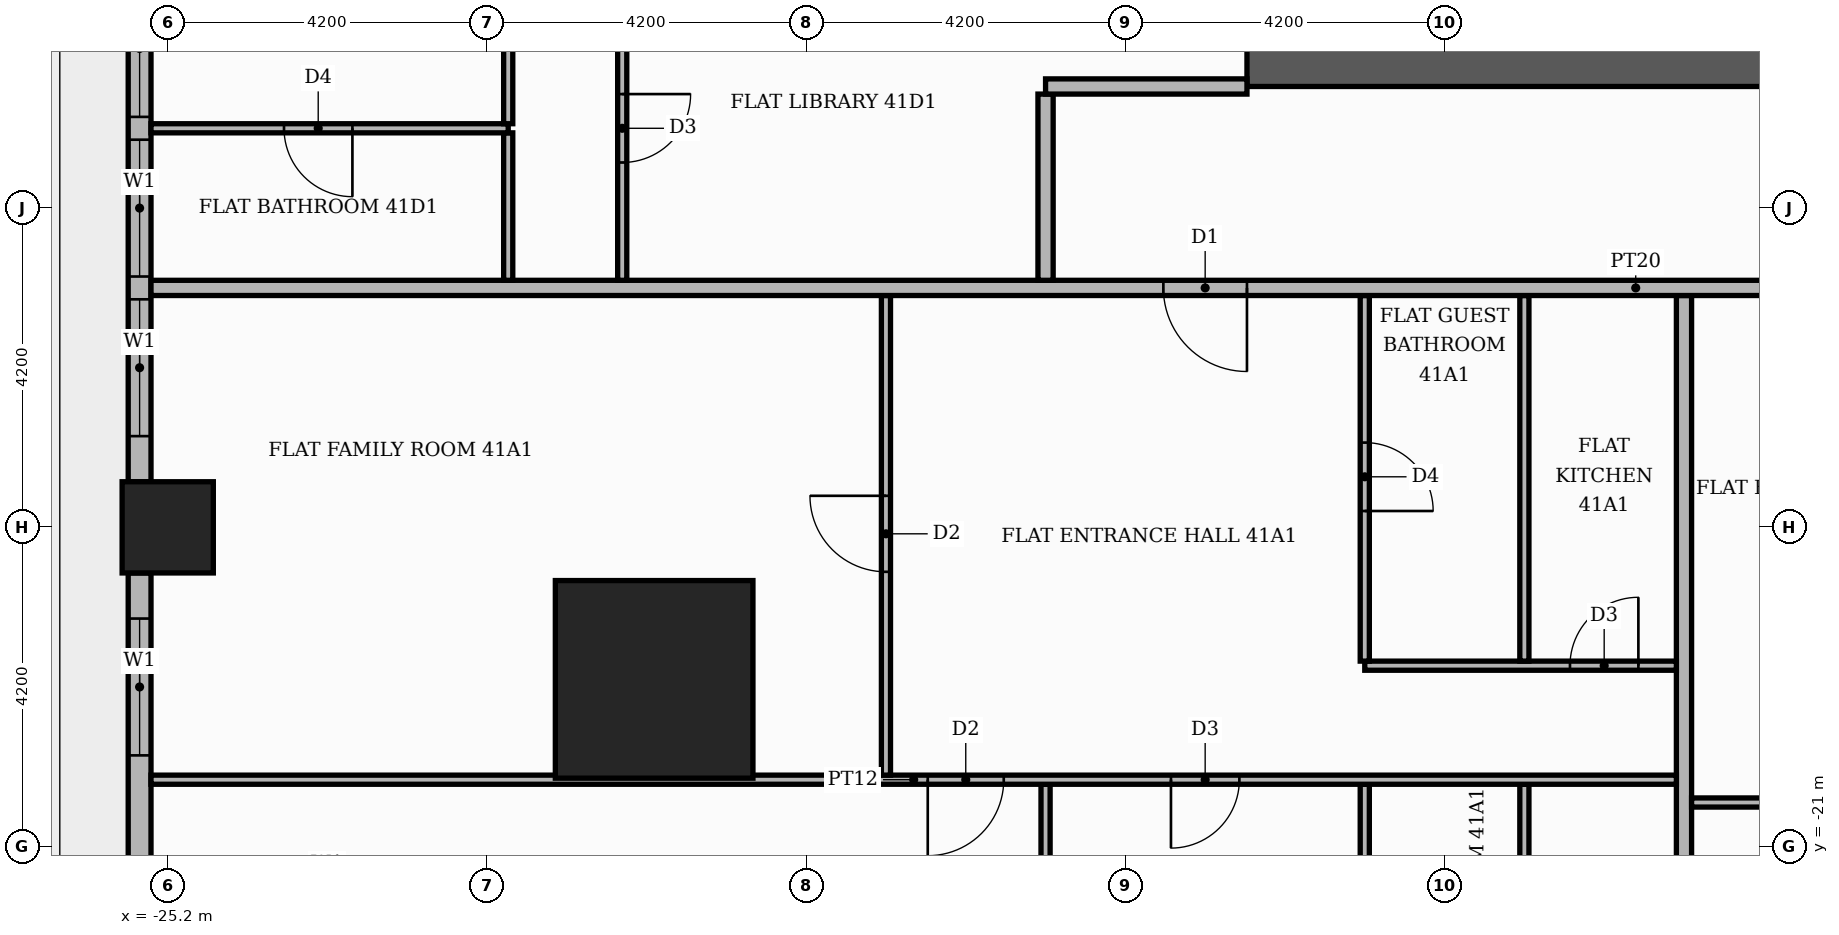
"""IFC4 building model, lengths in metres.
Left out: names, types, materials, properties, quantities, classifications, styles, units other than length and angle.
Written with IfcOpenShell. Run it as: python <this file> out.ifc"""

import sys

from ifc_helpers import new_model, si_unit, direction, frame, frame_2d, origin, origin_2d, place, context, subcontext, project, spatial, rectangle, extrude, element, fill, save


model = new_model("IFC4")
c1 = context("Model", 3, precision=1e-05, world=origin(), true_north=direction((0.0, 1.0)))
c2 = subcontext(c1, "Body", "Model", "MODEL_VIEW")
j1 = project(units=[si_unit("LENGTHUNIT", "METRE"), si_unit("PLANEANGLEUNIT", "RADIAN")], contexts=[c1])
p1 = place(None, origin())
s1 = spatial("IfcSite", under=j1, at=p1, CompositionType="ELEMENT")
p2 = place(p1, origin())
s2 = spatial("IfcBuilding", under=s1, at=p2, CompositionType="ELEMENT")
p3 = place(p2, frame((0.0, 0.0, 172.8)))
s3 = spatial("IfcBuildingStorey", under=s2, at=p3, CompositionType="ELEMENT", Elevation=172.8)
p4 = place(p3, frame((-11.0, -10.55, 0.0), z_axis=(0.0, 0.0, 1.0), x_axis=(1.0, 0.0, 0.0)))
e1 = element("IfcWall", 1, at=p4, inside=s3, PredefinedType="SHEAR", context=c2, shape_type="SweptSolid", body=[
    extrude(rectangle(XDim=22.0, YDim=0.9, at=frame_2d((11.0, 0.0))), origin(), (0.0, 0.0, 1.0), 3.48),
])
p5 = place(p4, frame((7.4, 0.0, 0.0)))
e2 = element("IfcOpeningElement", 2, at=p5, cuts=e1, PredefinedType="OPENING", context=c2, shape_type="SweptSolid", body=[
    extrude(rectangle(XDim=1.8, YDim=2.2, at=frame_2d((0.9, 1.1))), frame((0.0, 0.46, 0.0), z_axis=(0.0, -1.0, 0.0), x_axis=(1.0, 0.0, 0.0)), (0.0, 0.0, 1.0), 0.92),
])
p6 = place(p3, frame((-18.8, -18.8, 0.0), z_axis=(0.0, 0.0, 1.0), x_axis=(1.0, 0.0, 0.0)))
e3 = element("IfcColumn", 3, at=p6, inside=s3, PredefinedType="COLUMN", context=c2, shape_type="SweptSolid", body=[
    extrude(rectangle(XDim=2.6, YDim=2.6, at=origin_2d()), origin(), (0.0, 0.0, 1.0), 3.9),
])
p7 = place(p3, frame((-25.2, -16.8, 0.0), z_axis=(0.0, 0.0, 1.0), x_axis=(1.0, 0.0, 0.0)))
e4 = element("IfcColumn", 4, at=p7, inside=s3, PredefinedType="COLUMN", context=c2, shape_type="SweptSolid", body=[
    extrude(rectangle(XDim=1.2, YDim=1.2, at=origin_2d()), origin(), (0.0, 0.0, 1.0), 3.9),
])
p8 = place(p3, frame((-25.57, -9.0, 0.0), z_axis=(0.0, 0.0, 1.0), x_axis=(0.0, -1.0, 0.0)))
e5 = element("IfcWall", 5, at=p8, inside=s3, PredefinedType="STANDARD", context=c2, shape_type="SweptSolid", body=[
    extrude(rectangle(XDim=7.2, YDim=0.3, at=frame_2d((3.6, 0.0))), origin(), (0.0, 0.0, 1.0), 3.48),
])
p9 = place(p8, frame((0.6, 0.0, 0.9)))
e6 = element("IfcOpeningElement", 6, at=p9, cuts=e5, PredefinedType="OPENING", context=c2, shape_type="SweptSolid", body=[
    extrude(rectangle(XDim=1.8, YDim=2.1, at=frame_2d((0.9, 1.05))), frame((0.0, 0.16, 0.0), z_axis=(0.0, -1.0, 0.0), x_axis=(1.0, 0.0, 0.0)), (0.0, 0.0, 1.0), 0.32),
])
p10 = place(p8, frame((2.7, 0.0, 0.9)))
e7 = element("IfcOpeningElement", 7, at=p10, cuts=e5, PredefinedType="OPENING", context=c2, shape_type="SweptSolid", body=[
    extrude(rectangle(XDim=1.8, YDim=2.1, at=frame_2d((0.9, 1.05))), frame((0.0, 0.16, 0.0), z_axis=(0.0, -1.0, 0.0), x_axis=(1.0, 0.0, 0.0)), (0.0, 0.0, 1.0), 0.32),
])
p11 = place(p8, frame((4.8, 0.0, 0.9)))
e8 = element("IfcOpeningElement", 8, at=p11, cuts=e5, PredefinedType="OPENING", context=c2, shape_type="SweptSolid", body=[
    extrude(rectangle(XDim=1.8, YDim=2.1, at=frame_2d((0.9, 1.05))), frame((0.0, 0.16, 0.0), z_axis=(0.0, -1.0, 0.0), x_axis=(1.0, 0.0, 0.0)), (0.0, 0.0, 1.0), 0.32),
])
p12 = place(p3, frame((-25.57, -17.4, 0.0), z_axis=(0.0, 0.0, 1.0), x_axis=(0.0, -1.0, 0.0)))
e9 = element("IfcWall", 9, at=p12, inside=s3, PredefinedType="STANDARD", context=c2, shape_type="SweptSolid", body=[
    extrude(rectangle(XDim=4.32, YDim=0.3, at=frame_2d((2.16, 0.0))), origin(), (0.0, 0.0, 1.0), 3.48),
])
p13 = place(p12, frame((0.6, 0.0, 0.9)))
e10 = element("IfcOpeningElement", 10, at=p13, cuts=e9, PredefinedType="OPENING", context=c2, shape_type="SweptSolid", body=[
    extrude(rectangle(XDim=1.8, YDim=2.1, at=frame_2d((0.9, 1.05))), frame((0.0, 0.16, 0.0), z_axis=(0.0, -1.0, 0.0), x_axis=(1.0, 0.0, 0.0)), (0.0, 0.0, 1.0), 0.32),
])
p14 = place(p3, frame((-13.65, -25.42, 0.0), z_axis=(0.0, 0.0, 1.0), x_axis=(0.0, 1.0, 0.0)))
e11 = element("IfcWall", 11, at=p14, inside=s3, PredefinedType="PARTITIONING", context=c2, shape_type="SweptSolid", body=[
    extrude(rectangle(XDim=5.24, YDim=0.12, at=frame_2d((2.62, 0.0))), origin(), (0.0, 0.0, 1.0), 3.48),
])
p15 = place(p3, frame((-9.45, -25.42, 0.0), z_axis=(0.0, 0.0, 1.0), x_axis=(0.0, 1.0, 0.0)))
e12 = element("IfcWall", 12, at=p15, inside=s3, PredefinedType="PARTITIONING", context=c2, shape_type="SweptSolid", body=[
    extrude(rectangle(XDim=5.24, YDim=0.12, at=frame_2d((2.62, 0.0))), origin(), (0.0, 0.0, 1.0), 3.48),
])
p16 = place(p15, frame((2.05, 0.0, 0.0)))
e13 = element("IfcOpeningElement", 13, at=p16, cuts=e12, PredefinedType="OPENING", context=c2, shape_type="SweptSolid", body=[
    extrude(rectangle(XDim=0.9, YDim=2.1, at=frame_2d((0.45, 1.05))), frame((0.0, 0.07, 0.0), z_axis=(0.0, -1.0, 0.0), x_axis=(1.0, 0.0, 0.0)), (0.0, 0.0, 1.0), 0.14),
])
p17 = place(p3, frame((-7.35, -25.42, 0.0), z_axis=(0.0, 0.0, 1.0), x_axis=(0.0, 1.0, 0.0)))
e14 = element("IfcWall", 14, at=p17, inside=s3, PredefinedType="PARTITIONING", context=c2, shape_type="SweptSolid", body=[
    extrude(rectangle(XDim=5.24, YDim=0.12, at=frame_2d((2.62, 0.0))), origin(), (0.0, 0.0, 1.0), 3.48),
])
p18 = place(p17, frame((2.05, 0.0, 0.0)))
e15 = element("IfcOpeningElement", 15, at=p18, cuts=e14, PredefinedType="OPENING", context=c2, shape_type="SweptSolid", body=[
    extrude(rectangle(XDim=0.9, YDim=2.1, at=frame_2d((0.45, 1.05))), frame((0.0, 0.07, 0.0), z_axis=(0.0, -1.0, 0.0), x_axis=(1.0, 0.0, 0.0)), (0.0, 0.0, 1.0), 0.14),
])
p19 = place(p3, frame((-5.25, -25.42, 0.0), z_axis=(0.0, 0.0, 1.0), x_axis=(0.0, 1.0, 0.0)))
e16 = element("IfcWall", 16, at=p19, inside=s3, PredefinedType="PARTITIONING", context=c2, shape_type="SweptSolid", body=[
    extrude(rectangle(XDim=11.67, YDim=0.2, at=frame_2d((5.835, 0.0))), origin(), (0.0, 0.0, 1.0), 3.48),
])
p20 = place(p3, frame((-5.15, -20.42, 0.0), z_axis=(0.0, 0.0, 1.0), x_axis=(1.0, 0.0, 0.0)))
e17 = element("IfcWall", 17, at=p20, inside=s3, PredefinedType="PARTITIONING", context=c2, shape_type="SweptSolid", body=[
    extrude(rectangle(XDim=18.7, YDim=0.12, at=frame_2d((9.35, 0.0))), origin(), (0.0, 0.0, 1.0), 3.48),
])
p21 = place(p20, frame((1.5, 0.0, 0.0)))
e18 = element("IfcOpeningElement", 18, at=p21, cuts=e17, PredefinedType="OPENING", context=c2, shape_type="SweptSolid", body=[
    extrude(rectangle(XDim=1.0, YDim=2.1, at=frame_2d((0.5, 1.05))), frame((0.0, 0.07, 0.0), z_axis=(0.0, -1.0, 0.0), x_axis=(1.0, 0.0, 0.0)), (0.0, 0.0, 1.0), 0.14),
])
p22 = place(p20, frame((5.75, 0.0, 0.0)))
e19 = element("IfcOpeningElement", 19, at=p22, cuts=e17, PredefinedType="OPENING", context=c2, shape_type="SweptSolid", body=[
    extrude(rectangle(XDim=0.9, YDim=2.1, at=frame_2d((0.45, 1.05))), frame((0.0, 0.07, 0.0), z_axis=(0.0, -1.0, 0.0), x_axis=(1.0, 0.0, 0.0)), (0.0, 0.0, 1.0), 0.14),
])
p23 = place(p20, frame((14.15, 0.0, 0.0)))
e20 = element("IfcOpeningElement", 20, at=p23, cuts=e17, PredefinedType="OPENING", context=c2, shape_type="SweptSolid", body=[
    extrude(rectangle(XDim=0.9, YDim=2.1, at=frame_2d((0.45, 1.05))), frame((0.0, 0.07, 0.0), z_axis=(0.0, -1.0, 0.0), x_axis=(1.0, 0.0, 0.0)), (0.0, 0.0, 1.0), 0.14),
])
p24 = place(p3, frame((-25.42, -20.12, 0.0), z_axis=(0.0, 0.0, 1.0), x_axis=(1.0, 0.0, 0.0)))
e21 = element("IfcWall", 21, at=p24, inside=s3, PredefinedType="PARTITIONING", context=c2, shape_type="SweptSolid", body=[
    extrude(rectangle(XDim=20.07, YDim=0.12, at=frame_2d((10.035, 0.0))), origin(), (0.0, 0.0, 1.0), 3.48),
])
p25 = place(p24, frame((10.22, 0.0, 0.0)))
e22 = element("IfcOpeningElement", 22, at=p25, cuts=e21, PredefinedType="OPENING", context=c2, shape_type="SweptSolid", body=[
    extrude(rectangle(XDim=1.0, YDim=2.1, at=frame_2d((0.5, 1.05))), frame((0.0, 0.07, 0.0), z_axis=(0.0, -1.0, 0.0), x_axis=(1.0, 0.0, 0.0)), (0.0, 0.0, 1.0), 0.14),
])
p26 = place(p24, frame((13.42, 0.0, 0.0)))
e23 = element("IfcOpeningElement", 23, at=p26, cuts=e21, PredefinedType="OPENING", context=c2, shape_type="SweptSolid", body=[
    extrude(rectangle(XDim=0.9, YDim=2.1, at=frame_2d((0.45, 1.05))), frame((0.0, 0.07, 0.0), z_axis=(0.0, -1.0, 0.0), x_axis=(1.0, 0.0, 0.0)), (0.0, 0.0, 1.0), 0.14),
])
p27 = place(p3, frame((-15.75, -20.06, 0.0), z_axis=(0.0, 0.0, 1.0), x_axis=(0.0, 1.0, 0.0)))
e24 = element("IfcWall", 24, at=p27, inside=s3, PredefinedType="PARTITIONING", context=c2, shape_type="SweptSolid", body=[
    extrude(rectangle(XDim=6.31, YDim=0.12, at=frame_2d((3.155, 0.0))), origin(), (0.0, 0.0, 1.0), 3.48),
])
p28 = place(p27, frame((2.675, 0.0, 0.0)))
e25 = element("IfcOpeningElement", 25, at=p28, cuts=e24, PredefinedType="OPENING", context=c2, shape_type="SweptSolid", body=[
    extrude(rectangle(XDim=1.0, YDim=2.1, at=frame_2d((0.5, 1.05))), frame((0.0, 0.07, 0.0), z_axis=(0.0, -1.0, 0.0), x_axis=(1.0, 0.0, 0.0)), (0.0, 0.0, 1.0), 0.14),
])
p29 = place(p3, frame((-9.45, -18.62, 0.0), z_axis=(0.0, 0.0, 1.0), x_axis=(1.0, 0.0, 0.0)))
e26 = element("IfcWall", 26, at=p29, inside=s3, PredefinedType="PARTITIONING", context=c2, shape_type="SweptSolid", body=[
    extrude(rectangle(XDim=4.1, YDim=0.12, at=frame_2d((2.05, 0.0))), origin(), (0.0, 0.0, 1.0), 3.48),
])
p30 = place(p29, frame((2.7, 0.0, 0.0)))
e27 = element("IfcOpeningElement", 27, at=p30, cuts=e26, PredefinedType="OPENING", context=c2, shape_type="SweptSolid", body=[
    extrude(rectangle(XDim=0.9, YDim=2.1, at=frame_2d((0.45, 1.05))), frame((0.0, 0.07, 0.0), z_axis=(0.0, -1.0, 0.0), x_axis=(1.0, 0.0, 0.0)), (0.0, 0.0, 1.0), 0.14),
])
p31 = place(p3, frame((-9.45, -18.56, 0.0), z_axis=(0.0, 0.0, 1.0), x_axis=(0.0, 1.0, 0.0)))
e28 = element("IfcWall", 28, at=p31, inside=s3, PredefinedType="PARTITIONING", context=c2, shape_type="SweptSolid", body=[
    extrude(rectangle(XDim=4.81, YDim=0.12, at=frame_2d((2.405, 0.0))), origin(), (0.0, 0.0, 1.0), 3.48),
])
p32 = place(p31, frame((1.975, 0.0, 0.0)))
e29 = element("IfcOpeningElement", 29, at=p32, cuts=e28, PredefinedType="OPENING", context=c2, shape_type="SweptSolid", body=[
    extrude(rectangle(XDim=0.9, YDim=2.1, at=frame_2d((0.45, 1.05))), frame((0.0, 0.07, 0.0), z_axis=(0.0, -1.0, 0.0), x_axis=(1.0, 0.0, 0.0)), (0.0, 0.0, 1.0), 0.14),
])
p33 = place(p3, frame((-7.35, -18.56, 0.0), z_axis=(0.0, 0.0, 1.0), x_axis=(0.0, 1.0, 0.0)))
e30 = element("IfcWall", 30, at=p33, inside=s3, PredefinedType="PARTITIONING", context=c2, shape_type="SweptSolid", body=[
    extrude(rectangle(XDim=4.81, YDim=0.12, at=frame_2d((2.405, 0.0))), origin(), (0.0, 0.0, 1.0), 3.48),
])
p34 = place(p3, frame((-25.42, -13.65, 0.0), z_axis=(0.0, 0.0, 1.0), x_axis=(1.0, 0.0, 0.0)))
e31 = element("IfcWall", 31, at=p34, inside=s3, PredefinedType="PARTITIONING", context=c2, shape_type="SweptSolid", body=[
    extrude(rectangle(XDim=39.07, YDim=0.2, at=frame_2d((19.535, 0.0))), origin(), (0.0, 0.0, 1.0), 3.48),
])
p35 = place(p34, frame((13.32, 0.0, 0.0)))
e32 = element("IfcOpeningElement", 32, at=p35, cuts=e31, PredefinedType="OPENING", context=c2, shape_type="SweptSolid", body=[
    extrude(rectangle(XDim=1.1, YDim=2.4, at=frame_2d((0.55, 1.2))), frame((0.0, 0.11, 0.0), z_axis=(0.0, -1.0, 0.0), x_axis=(1.0, 0.0, 0.0)), (0.0, 0.0, 1.0), 0.22),
])
p36 = place(p34, frame((21.72, 0.0, 0.0)))
e33 = element("IfcOpeningElement", 33, at=p36, cuts=e31, PredefinedType="OPENING", context=c2, shape_type="SweptSolid", body=[
    extrude(rectangle(XDim=1.1, YDim=2.4, at=frame_2d((0.55, 1.2))), frame((0.0, 0.11, 0.0), z_axis=(0.0, -1.0, 0.0), x_axis=(1.0, 0.0, 0.0)), (0.0, 0.0, 1.0), 0.22),
])
p37 = place(p3, frame((-20.72, -13.55, 0.0), z_axis=(0.0, 0.0, 1.0), x_axis=(0.0, 1.0, 0.0)))
e34 = element("IfcWall", 34, at=p37, inside=s3, PredefinedType="PARTITIONING", context=c2, shape_type="SweptSolid", body=[
    extrude(rectangle(XDim=1.94, YDim=0.12, at=frame_2d((0.97, 0.0))), origin(), (0.0, 0.0, 1.0), 3.48),
])
p38 = place(p3, frame((-19.22, -13.55, 0.0), z_axis=(0.0, 0.0, 1.0), x_axis=(0.0, 1.0, 0.0)))
e35 = element("IfcWall", 35, at=p38, inside=s3, PredefinedType="PARTITIONING", context=c2, shape_type="SweptSolid", body=[
    extrude(rectangle(XDim=4.04, YDim=0.12, at=frame_2d((2.02, 0.0))), origin(), (0.0, 0.0, 1.0), 3.48),
])
p39 = place(p38, frame((1.55, 0.0, 0.0)))
e36 = element("IfcOpeningElement", 36, at=p39, cuts=e35, PredefinedType="OPENING", context=c2, shape_type="SweptSolid", body=[
    extrude(rectangle(XDim=0.9, YDim=2.1, at=frame_2d((0.45, 1.05))), frame((0.0, 0.07, 0.0), z_axis=(0.0, -1.0, 0.0), x_axis=(1.0, 0.0, 0.0)), (0.0, 0.0, 1.0), 0.14),
])
p40 = place(p3, frame((-13.65, -13.55, 0.0), z_axis=(0.0, 0.0, 1.0), x_axis=(0.0, 1.0, 0.0)))
e37 = element("IfcWall", 37, at=p40, inside=s3, PredefinedType="PARTITIONING", context=c2, shape_type="SweptSolid", body=[
    extrude(rectangle(XDim=2.45, YDim=0.2, at=frame_2d((1.225, 0.0))), origin(), (0.0, 0.0, 1.0), 3.48),
])
p41 = place(p3, frame((-25.42, -11.55, 0.0), z_axis=(0.0, 0.0, 1.0), x_axis=(1.0, 0.0, 0.0)))
e38 = element("IfcWall", 38, at=p41, inside=s3, PredefinedType="PARTITIONING", context=c2, shape_type="SweptSolid", body=[
    extrude(rectangle(XDim=4.7, YDim=0.12, at=frame_2d((2.35, 0.0))), origin(), (0.0, 0.0, 1.0), 3.48),
])
p42 = place(p41, frame((1.75, 0.0, 0.0)))
e39 = element("IfcOpeningElement", 39, at=p42, cuts=e38, PredefinedType="OPENING", context=c2, shape_type="SweptSolid", body=[
    extrude(rectangle(XDim=0.9, YDim=2.1, at=frame_2d((0.45, 1.05))), frame((0.0, 0.07, 0.0), z_axis=(0.0, -1.0, 0.0), x_axis=(1.0, 0.0, 0.0)), (0.0, 0.0, 1.0), 0.14),
])
p43 = place(p3, frame((-20.72, -11.49, 0.0), z_axis=(0.0, 0.0, 1.0), x_axis=(0.0, 1.0, 0.0)))
e40 = element("IfcWall", 40, at=p43, inside=s3, PredefinedType="PARTITIONING", context=c2, shape_type="SweptSolid", body=[
    extrude(rectangle(XDim=4.08, YDim=0.12, at=frame_2d((2.04, 0.0))), origin(), (0.0, 0.0, 1.0), 3.48),
])
p44 = place(p43, frame((1.59, 0.0, 0.0)))
e41 = element("IfcOpeningElement", 41, at=p44, cuts=e40, PredefinedType="OPENING", context=c2, shape_type="SweptSolid", body=[
    extrude(rectangle(XDim=0.9, YDim=2.1, at=frame_2d((0.45, 1.05))), frame((0.0, 0.07, 0.0), z_axis=(0.0, -1.0, 0.0), x_axis=(1.0, 0.0, 0.0)), (0.0, 0.0, 1.0), 0.14),
])
p45 = place(p3, frame((-13.65, -11.0, 0.0), z_axis=(0.0, 0.0, 1.0), x_axis=(1.0, 0.0, 0.0)))
e42 = element("IfcWall", 42, at=p45, inside=s3, PredefinedType="PARTITIONING", context=c2, shape_type="SweptSolid", body=[
    extrude(rectangle(XDim=2.65, YDim=0.2, at=frame_2d((1.325, 0.0))), origin(), (0.0, 0.0, 1.0), 3.48),
])
p46 = place(p9, origin())
e43 = element("IfcWindow", 43, at=p46, inside=s3, PartitioningType="SINGLE_PANEL", PredefinedType="WINDOW", context=c2, shape_type="SweptSolid", body=[
    extrude(rectangle(XDim=1.8, YDim=2.1, at=frame_2d((0.9, 1.05))), frame((0.0, 0.03, 0.0), z_axis=(0.0, -1.0, 0.0), x_axis=(1.0, 0.0, 0.0)), (0.0, 0.0, 1.0), 0.06),
])
fill(e6, e43)
p47 = place(p10, origin())
e44 = element("IfcWindow", 44, at=p47, inside=s3, PartitioningType="SINGLE_PANEL", PredefinedType="WINDOW", context=c2, shape_type="SweptSolid", body=[
    extrude(rectangle(XDim=1.8, YDim=2.1, at=frame_2d((0.9, 1.05))), frame((0.0, 0.03, 0.0), z_axis=(0.0, -1.0, 0.0), x_axis=(1.0, 0.0, 0.0)), (0.0, 0.0, 1.0), 0.06),
])
fill(e7, e44)
p48 = place(p11, origin())
e45 = element("IfcWindow", 45, at=p48, inside=s3, PartitioningType="SINGLE_PANEL", PredefinedType="WINDOW", context=c2, shape_type="SweptSolid", body=[
    extrude(rectangle(XDim=1.8, YDim=2.1, at=frame_2d((0.9, 1.05))), frame((0.0, 0.03, 0.0), z_axis=(0.0, -1.0, 0.0), x_axis=(1.0, 0.0, 0.0)), (0.0, 0.0, 1.0), 0.06),
])
fill(e8, e45)
p49 = place(p13, origin())
e46 = element("IfcWindow", 46, at=p49, inside=s3, PartitioningType="SINGLE_PANEL", PredefinedType="WINDOW", context=c2, shape_type="SweptSolid", body=[
    extrude(rectangle(XDim=1.8, YDim=2.1, at=frame_2d((0.9, 1.05))), frame((0.0, 0.03, 0.0), z_axis=(0.0, -1.0, 0.0), x_axis=(1.0, 0.0, 0.0)), (0.0, 0.0, 1.0), 0.06),
])
fill(e10, e46)
p50 = place(p35, frame((1.1, 0.0, 0.0), z_axis=(0.0, 0.0, 1.0), x_axis=(-1.0, 0.0, 0.0)))
e47 = element("IfcDoor", 47, at=p50, inside=s3, OperationType="SINGLE_SWING_RIGHT", PredefinedType="DOOR", context=c2, shape_type="SweptSolid", body=[
    extrude(rectangle(XDim=1.1, YDim=2.4, at=frame_2d((0.55, 1.2))), frame((0.0, 0.025, 0.0), z_axis=(0.0, -1.0, 0.0), x_axis=(1.0, 0.0, 0.0)), (0.0, 0.0, 1.0), 0.05),
])
fill(e32, e47)
p51 = place(p28, origin())
e48 = element("IfcDoor", 48, at=p51, inside=s3, OperationType="SINGLE_SWING_RIGHT", PredefinedType="DOOR", context=c2, shape_type="SweptSolid", body=[
    extrude(rectangle(XDim=1.0, YDim=2.1, at=frame_2d((0.5, 1.05))), frame((0.0, 0.025, 0.0), z_axis=(0.0, -1.0, 0.0), x_axis=(1.0, 0.0, 0.0)), (0.0, 0.0, 1.0), 0.05),
])
fill(e25, e48)
p52 = place(p32, frame((0.9, 0.0, 0.0), z_axis=(0.0, 0.0, 1.0), x_axis=(-1.0, 0.0, 0.0)))
e49 = element("IfcDoor", 49, at=p52, inside=s3, OperationType="SINGLE_SWING_LEFT", PredefinedType="DOOR", context=c2, shape_type="SweptSolid", body=[
    extrude(rectangle(XDim=0.9, YDim=2.1, at=frame_2d((0.45, 1.05))), frame((0.0, 0.025, 0.0), z_axis=(0.0, -1.0, 0.0), x_axis=(1.0, 0.0, 0.0)), (0.0, 0.0, 1.0), 0.05),
])
fill(e29, e49)
p53 = place(p30, origin())
e50 = element("IfcDoor", 50, at=p53, inside=s3, OperationType="SINGLE_SWING_RIGHT", PredefinedType="DOOR", context=c2, shape_type="SweptSolid", body=[
    extrude(rectangle(XDim=0.9, YDim=2.1, at=frame_2d((0.45, 1.05))), frame((0.0, 0.025, 0.0), z_axis=(0.0, -1.0, 0.0), x_axis=(1.0, 0.0, 0.0)), (0.0, 0.0, 1.0), 0.05),
])
fill(e27, e50)
p54 = place(p25, frame((1.0, 0.0, 0.0), z_axis=(0.0, 0.0, 1.0), x_axis=(-1.0, 0.0, 0.0)))
e51 = element("IfcDoor", 51, at=p54, inside=s3, OperationType="SINGLE_SWING_LEFT", PredefinedType="DOOR", context=c2, shape_type="SweptSolid", body=[
    extrude(rectangle(XDim=1.0, YDim=2.1, at=frame_2d((0.5, 1.05))), frame((0.0, 0.025, 0.0), z_axis=(0.0, -1.0, 0.0), x_axis=(1.0, 0.0, 0.0)), (0.0, 0.0, 1.0), 0.05),
])
fill(e22, e51)
p55 = place(p26, frame((0.9, 0.0, 0.0), z_axis=(0.0, 0.0, 1.0), x_axis=(-1.0, 0.0, 0.0)))
e52 = element("IfcDoor", 52, at=p55, inside=s3, OperationType="SINGLE_SWING_LEFT", PredefinedType="DOOR", context=c2, shape_type="SweptSolid", body=[
    extrude(rectangle(XDim=0.9, YDim=2.1, at=frame_2d((0.45, 1.05))), frame((0.0, 0.025, 0.0), z_axis=(0.0, -1.0, 0.0), x_axis=(1.0, 0.0, 0.0)), (0.0, 0.0, 1.0), 0.05),
])
fill(e23, e52)
p56 = place(p39, frame((0.9, 0.0, 0.0), z_axis=(0.0, 0.0, 1.0), x_axis=(-1.0, 0.0, 0.0)))
e53 = element("IfcDoor", 53, at=p56, inside=s3, OperationType="SINGLE_SWING_RIGHT", PredefinedType="DOOR", context=c2, shape_type="SweptSolid", body=[
    extrude(rectangle(XDim=0.9, YDim=2.1, at=frame_2d((0.45, 1.05))), frame((0.0, 0.025, 0.0), z_axis=(0.0, -1.0, 0.0), x_axis=(1.0, 0.0, 0.0)), (0.0, 0.0, 1.0), 0.05),
])
fill(e36, e53)
p57 = place(p42, frame((0.9, 0.0, 0.0), z_axis=(0.0, 0.0, 1.0), x_axis=(-1.0, 0.0, 0.0)))
e54 = element("IfcDoor", 54, at=p57, inside=s3, OperationType="SINGLE_SWING_RIGHT", PredefinedType="DOOR", context=c2, shape_type="SweptSolid", body=[
    extrude(rectangle(XDim=0.9, YDim=2.1, at=frame_2d((0.45, 1.05))), frame((0.0, 0.025, 0.0), z_axis=(0.0, -1.0, 0.0), x_axis=(1.0, 0.0, 0.0)), (0.0, 0.0, 1.0), 0.05),
])
fill(e39, e54)
save(model, sys.argv[1])
